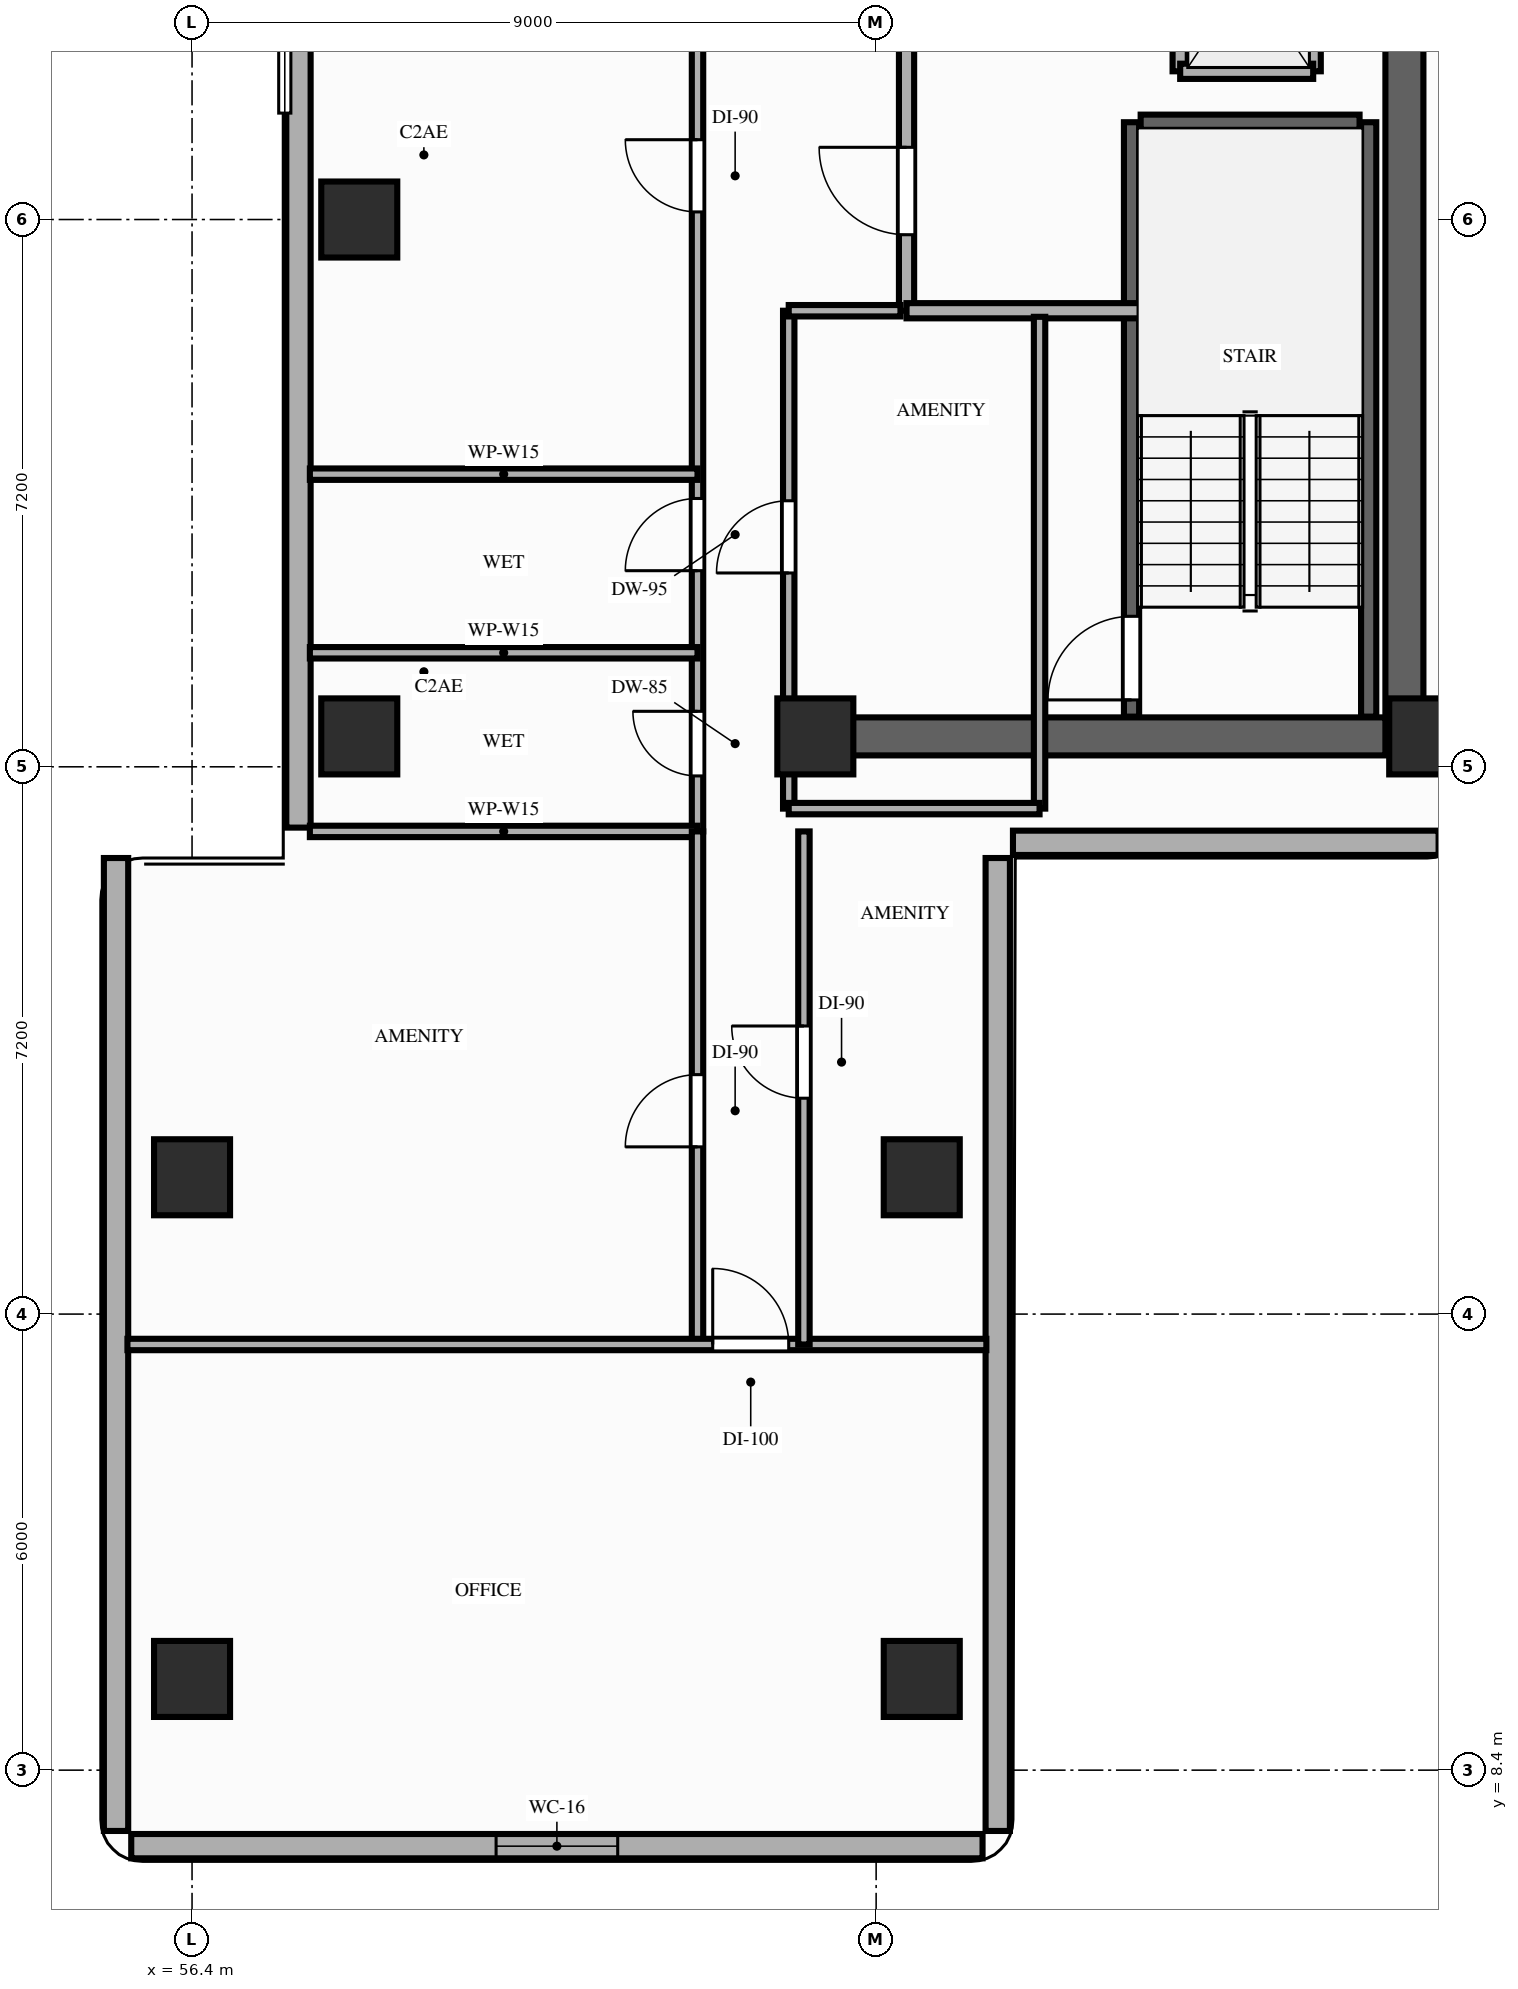
"""IFC4 building model, lengths in metres.
Left out: names, types, materials, properties, quantities, classifications, styles, units other than length and angle.
Written with IfcOpenShell. Run it as: python <this file> out.ifc"""

import sys

from ifc_helpers import new_model, si_unit, direction, frame, frame_2d, origin, origin_2d, place, context, subcontext, project, spatial, rectangle, extrude, element, fill, save


model = new_model("IFC4")
c1 = context("Model", 3, precision=1e-05, world=origin(), true_north=direction((0.0, 1.0)))
c2 = subcontext(c1, "Body", "Model", "MODEL_VIEW")
j1 = project(units=[si_unit("LENGTHUNIT", "METRE"), si_unit("PLANEANGLEUNIT", "RADIAN")], contexts=[c1])
p1 = place(None, origin())
s1 = spatial("IfcSite", under=j1, at=p1, CompositionType="ELEMENT")
p2 = place(p1, origin())
s2 = spatial("IfcBuilding", under=s1, at=p2, CompositionType="ELEMENT")
p3 = place(p2, frame((0.0, 0.0, 43.6)))
s3 = spatial("IfcBuildingStorey", under=s2, at=p3, CompositionType="ELEMENT", Elevation=43.6)
for number, where, z_axis, x_axis in (
    (1, (64.6, 22.0, 0.0), (0.0, 0.0, 1.0), (1.0, 0.0, 0.0)),
    (2, (72.65, 22.0, 0.0), (0.0, 0.0, 1.0), (1.0, 0.0, 0.0)),
    (3, (58.6, 22.0, 0.0), (0.0, 0.0, 1.0), (1.0, 0.0, 0.0)),
    (4, (58.6, 28.8, 0.0), (0.0, 0.0, 1.0), (1.0, 0.0, 0.0)),
    (5, (56.4, 9.6, 0.0), (0.0, 0.0, 1.0), (1.0, 0.0, 0.0)),
    (6, (56.4, 16.2, 0.0), (0.0, 0.0, 1.0), (1.0, 0.0, 0.0)),
    (7, (66.0, 9.6, 0.0), (0.0, 0.0, 1.0), (1.0, 0.0, 0.0)),
    (8, (66.0, 16.2, 0.0), (0.0, 0.0, 1.0), (1.0, 0.0, 0.0)),
):
    element("IfcColumn", number, at=place(p3, frame(where, z_axis=z_axis, x_axis=x_axis)), inside=s3, PredefinedType="COLUMN", context=c2, shape_type="SweptSolid", body=[
        extrude(rectangle(XDim=1.0, YDim=1.0, at=origin_2d()), origin(), (0.0, 0.0, 1.0), 3.2),
    ])
p4 = place(p3, frame((57.8, 43.4, 0.0), z_axis=(0.0, 0.0, 1.0), x_axis=(0.0, -1.0, 0.0)))
e9 = element("IfcWall", 9, at=p4, inside=s3, PredefinedType="STANDARD", context=c2, shape_type="SweptSolid", body=[
    extrude(rectangle(XDim=22.6, YDim=0.32, at=frame_2d((11.3, 0.0))), origin(), (0.0, 0.0, 1.0), 2.5),
])
p5 = place(p4, frame((3.7, 0.0, 0.0)))
e10 = element("IfcOpeningElement", 10, at=p5, cuts=e9, PredefinedType="OPENING", context=c2, shape_type="SweptSolid", body=[
    extrude(rectangle(XDim=1.4, YDim=2.1, at=frame_2d((0.7, 1.05))), frame((0.0, 0.17, 0.0), z_axis=(0.0, -1.0, 0.0), x_axis=(1.0, 0.0, 0.0)), (0.0, 0.0, 1.0), 0.34),
])
p6 = place(p3, frame((55.6, 7.4, 0.0), z_axis=(0.0, 0.0, 1.0), x_axis=(1.0, 0.0, 0.0)))
e11 = element("IfcWall", 11, at=p6, inside=s3, PredefinedType="STANDARD", context=c2, shape_type="SweptSolid", body=[
    extrude(rectangle(XDim=11.2, YDim=0.32, at=frame_2d((5.6, 0.0))), origin(), (0.0, 0.0, 1.0), 3.02),
])
p7 = place(p6, frame((4.8, 0.0, 0.85)))
e12 = element("IfcOpeningElement", 12, at=p7, cuts=e11, PredefinedType="OPENING", context=c2, shape_type="SweptSolid", body=[
    extrude(rectangle(XDim=1.6, YDim=1.7, at=frame_2d((0.8, 0.85))), frame((0.0, 0.17, 0.0), z_axis=(0.0, -1.0, 0.0), x_axis=(1.0, 0.0, 0.0)), (0.0, 0.0, 1.0), 0.34),
])
for number, where, z_axis, x_axis in (
    (13, (55.4, 20.4, 0.0), (0.0, 0.0, 1.0), (0.0, -1.0, 0.0)),
    (14, (67.0, 7.6, 0.0), (0.0, 0.0, 1.0), (0.0, 1.0, 0.0)),
):
    element("IfcWall", number, at=place(p3, frame(where, z_axis=z_axis, x_axis=x_axis)), inside=s3, PredefinedType="STANDARD", context=c2, shape_type="SweptSolid", body=[
        extrude(rectangle(XDim=12.8, YDim=0.32, at=frame_2d((6.4, 0.0))), origin(), (0.0, 0.0, 1.0), 3.02),
    ])
p8 = place(p3, frame((67.2, 20.6, 0.0), z_axis=(0.0, 0.0, 1.0), x_axis=(1.0, 0.0, 0.0)))
e15 = element("IfcWall", 15, at=p8, inside=s3, PredefinedType="STANDARD", context=c2, shape_type="SweptSolid", body=[
    extrude(rectangle(XDim=5.6, YDim=0.32, at=frame_2d((2.8, 0.0))), origin(), (0.0, 0.0, 1.0), 3.02),
])
p9 = place(p3, frame((72.35, 22.0, 0.0), z_axis=(0.0, 0.0, 1.0), x_axis=(0.0, 1.0, 0.0)))
e16 = element("IfcWall", 16, at=p9, inside=s3, PredefinedType="SHEAR", context=c2, shape_type="SweptSolid", body=[
    extrude(rectangle(XDim=20.25, YDim=0.5, at=frame_2d((10.125, 0.0))), origin(), (0.0, 0.0, 1.0), 3.02),
])
p10 = place(p3, frame((64.6, 22.0, 0.0), z_axis=(0.0, 0.0, 1.0), x_axis=(1.0, 0.0, 0.0)))
e17 = element("IfcWall", 17, at=p10, inside=s3, PredefinedType="SHEAR", context=c2, shape_type="SweptSolid", body=[
    extrude(rectangle(XDim=7.5, YDim=0.5, at=frame_2d((3.75, 0.0))), origin(), (0.0, 0.0, 1.0), 3.02),
])
p11 = place(p3, frame((68.76, 22.26, 0.0), z_axis=(0.0, 0.0, 1.0), x_axis=(0.0, 1.0, 0.0)))
e18 = element("IfcWall", 18, at=p11, inside=s3, PredefinedType="SHEAR", context=c2, shape_type="SweptSolid", body=[
    extrude(rectangle(XDim=7.82, YDim=0.2, at=frame_2d((3.91, 0.0))), origin(), (0.0, 0.0, 1.0), 3.02),
])
p12 = place(p11, frame((0.22, 0.0, 0.0)))
e19 = element("IfcOpeningElement", 19, at=p12, cuts=e18, PredefinedType="OPENING", context=c2, shape_type="SweptSolid", body=[
    extrude(rectangle(XDim=1.1, YDim=2.15, at=frame_2d((0.55, 1.075))), frame((0.0, 0.11, 0.0), z_axis=(0.0, -1.0, 0.0), x_axis=(1.0, 0.0, 0.0)), (0.0, 0.0, 1.0), 0.22),
])
p13 = place(p3, frame((71.88, 22.26, 0.0), z_axis=(0.0, 0.0, 1.0), x_axis=(0.0, 1.0, 0.0)))
e20 = element("IfcWall", 20, at=p13, inside=s3, PredefinedType="SHEAR", context=c2, shape_type="SweptSolid", body=[
    extrude(rectangle(XDim=7.82, YDim=0.2, at=frame_2d((3.91, 0.0))), origin(), (0.0, 0.0, 1.0), 3.02),
])
p14 = place(p3, frame((68.88, 30.08, 0.0), z_axis=(0.0, 0.0, 1.0), x_axis=(1.0, 0.0, 0.0)))
e21 = element("IfcWall", 21, at=p14, inside=s3, PredefinedType="SHEAR", context=c2, shape_type="SweptSolid", body=[
    extrude(rectangle(XDim=2.88, YDim=0.2, at=frame_2d((1.44, 0.0))), origin(), (0.0, 0.0, 1.0), 3.02),
])
p15 = place(p3, frame((69.4, 30.75, 0.0), z_axis=(0.0, 0.0, 1.0), x_axis=(0.0, 1.0, 0.0)))
e22 = element("IfcWall", 22, at=p15, inside=s3, PredefinedType="MOVABLE", context=c2, shape_type="SweptSolid", body=[
    extrude(rectangle(XDim=2.45, YDim=0.2, at=frame_2d((1.225, 0.0))), origin(), (0.0, 0.0, 1.0), 3.02),
])
p16 = place(p15, frame((0.65, 0.0, 0.0)))
e23 = element("IfcOpeningElement", 23, at=p16, cuts=e22, PredefinedType="OPENING", context=c2, shape_type="SweptSolid", body=[
    extrude(rectangle(XDim=1.05, YDim=2.15, at=frame_2d((0.525, 1.075))), frame((0.0, 0.11, 0.0), z_axis=(0.0, -1.0, 0.0), x_axis=(1.0, 0.0, 0.0)), (0.0, 0.0, 1.0), 0.22),
])
p17 = place(p3, frame((71.15, 30.75, 0.0), z_axis=(0.0, 0.0, 1.0), x_axis=(0.0, 1.0, 0.0)))
e24 = element("IfcWall", 24, at=p17, inside=s3, PredefinedType="MOVABLE", context=c2, shape_type="SweptSolid", body=[
    extrude(rectangle(XDim=2.45, YDim=0.2, at=frame_2d((1.225, 0.0))), origin(), (0.0, 0.0, 1.0), 3.02),
])
p18 = place(p3, frame((69.4, 30.75, 0.0), z_axis=(0.0, 0.0, 1.0), x_axis=(1.0, 0.0, 0.0)))
e25 = element("IfcWall", 25, at=p18, inside=s3, PredefinedType="MOVABLE", context=c2, shape_type="SweptSolid", body=[
    extrude(rectangle(XDim=1.75, YDim=0.2, at=frame_2d((0.875, 0.0))), origin(), (0.0, 0.0, 1.0), 3.02),
])
p19 = place(p3, frame((65.8, 27.6, 0.0), z_axis=(0.0, 0.0, 1.0), x_axis=(0.0, 1.0, 0.0)))
e26 = element("IfcWall", 26, at=p19, inside=s3, PredefinedType="PARTITIONING", context=c2, shape_type="SweptSolid", body=[
    extrude(rectangle(XDim=5.5, YDim=0.2, at=frame_2d((2.75, 0.0))), origin(), (0.0, 0.0, 1.0), 3.02),
])
p20 = place(p19, frame((1.0, 0.0, 0.0)))
e27 = element("IfcOpeningElement", 27, at=p20, cuts=e26, PredefinedType="OPENING", context=c2, shape_type="SweptSolid", body=[
    extrude(rectangle(XDim=1.15, YDim=2.15, at=frame_2d((0.575, 1.075))), frame((0.0, 0.11, 0.0), z_axis=(0.0, -1.0, 0.0), x_axis=(1.0, 0.0, 0.0)), (0.0, 0.0, 1.0), 0.22),
])
p21 = place(p3, frame((65.8, 27.6, 0.0), z_axis=(0.0, 0.0, 1.0), x_axis=(1.0, 0.0, 0.0)))
e28 = element("IfcWall", 28, at=p21, inside=s3, PredefinedType="PARTITIONING", context=c2, shape_type="SweptSolid", body=[
    extrude(rectangle(XDim=3.4, YDim=0.2, at=frame_2d((1.7, 0.0))), origin(), (0.0, 0.0, 1.0), 3.02),
])
p22 = place(p3, frame((64.25, 21.05, 0.0), z_axis=(0.0, 0.0, 1.0), x_axis=(0.0, 1.0, 0.0)))
e29 = element("IfcWall", 29, at=p22, inside=s3, PredefinedType="PARTITIONING", context=c2, shape_type="SweptSolid", body=[
    extrude(rectangle(XDim=6.55, YDim=0.15, at=frame_2d((3.275, 0.0))), origin(), (0.0, 0.0, 1.0), 2.5),
])
p23 = place(p22, frame((3.1, 0.0, 0.0)))
e30 = element("IfcOpeningElement", 30, at=p23, cuts=e29, PredefinedType="OPENING", context=c2, shape_type="SweptSolid", body=[
    extrude(rectangle(XDim=0.95, YDim=2.15, at=frame_2d((0.475, 1.075))), frame((0.0, 0.085, 0.0), z_axis=(0.0, -1.0, 0.0), x_axis=(1.0, 0.0, 0.0)), (0.0, 0.0, 1.0), 0.17),
])
p24 = place(p3, frame((67.55, 21.05, 0.0), z_axis=(0.0, 0.0, 1.0), x_axis=(0.0, 1.0, 0.0)))
e31 = element("IfcWall", 31, at=p24, inside=s3, PredefinedType="PARTITIONING", context=c2, shape_type="SweptSolid", body=[
    extrude(rectangle(XDim=6.47, YDim=0.15, at=frame_2d((3.235, 0.0))), origin(), (0.0, 0.0, 1.0), 2.5),
])
p25 = place(p3, frame((64.25, 21.05, 0.0), z_axis=(0.0, 0.0, 1.0), x_axis=(1.0, 0.0, 0.0)))
e32 = element("IfcWall", 32, at=p25, inside=s3, PredefinedType="PARTITIONING", context=c2, shape_type="SweptSolid", body=[
    extrude(rectangle(XDim=3.3, YDim=0.15, at=frame_2d((1.65, 0.0))), origin(), (0.0, 0.0, 1.0), 2.5),
])
p26 = place(p3, frame((64.25, 27.6, 0.0), z_axis=(0.0, 0.0, 1.0), x_axis=(1.0, 0.0, 0.0)))
e33 = element("IfcWall", 33, at=p26, inside=s3, PredefinedType="PARTITIONING", context=c2, shape_type="SweptSolid", body=[
    extrude(rectangle(XDim=1.47, YDim=0.15, at=frame_2d((0.735, 0.0))), origin(), (0.0, 0.0, 1.0), 2.5),
])
p27 = place(p3, frame((63.05, 20.75, 0.0), z_axis=(0.0, 0.0, 1.0), x_axis=(0.0, 1.0, 0.0)))
e34 = element("IfcWall", 34, at=p27, inside=s3, PredefinedType="PARTITIONING", context=c2, shape_type="SweptSolid", body=[
    extrude(rectangle(XDim=22.7, YDim=0.15, at=frame_2d((11.35, 0.0))), origin(), (0.0, 0.0, 1.0), 2.5),
])
p28 = place(p27, frame((0.73, 0.0, 0.0)))
e35 = element("IfcOpeningElement", 35, at=p28, cuts=e34, PredefinedType="OPENING", context=c2, shape_type="SweptSolid", body=[
    extrude(rectangle(XDim=0.85, YDim=2.1, at=frame_2d((0.425, 1.05))), frame((0.0, 0.085, 0.0), z_axis=(0.0, -1.0, 0.0), x_axis=(1.0, 0.0, 0.0)), (0.0, 0.0, 1.0), 0.17),
])
p29 = place(p27, frame((3.43, 0.0, 0.0)))
e36 = element("IfcOpeningElement", 36, at=p29, cuts=e34, PredefinedType="OPENING", context=c2, shape_type="SweptSolid", body=[
    extrude(rectangle(XDim=0.95, YDim=2.1, at=frame_2d((0.475, 1.05))), frame((0.0, 0.085, 0.0), z_axis=(0.0, -1.0, 0.0), x_axis=(1.0, 0.0, 0.0)), (0.0, 0.0, 1.0), 0.17),
])
p30 = place(p27, frame((8.15, 0.0, 0.0)))
e37 = element("IfcOpeningElement", 37, at=p30, cuts=e34, PredefinedType="OPENING", context=c2, shape_type="SweptSolid", body=[
    extrude(rectangle(XDim=0.95, YDim=2.15, at=frame_2d((0.475, 1.075))), frame((0.0, 0.085, 0.0), z_axis=(0.0, -1.0, 0.0), x_axis=(1.0, 0.0, 0.0)), (0.0, 0.0, 1.0), 0.17),
])
for number, where, z_axis, x_axis in (
    (38, (57.95, 20.75, 0.0), (0.0, 0.0, 1.0), (1.0, 0.0, 0.0)),
    (39, (57.95, 23.1, 0.0), (0.0, 0.0, 1.0), (1.0, 0.0, 0.0)),
    (40, (57.95, 25.45, 0.0), (0.0, 0.0, 1.0), (1.0, 0.0, 0.0)),
):
    element("IfcWall", number, at=place(p3, frame(where, z_axis=z_axis, x_axis=x_axis)), inside=s3, PredefinedType="PARTITIONING", context=c2, shape_type="SweptSolid", body=[
        extrude(rectangle(XDim=5.1, YDim=0.15, at=frame_2d((2.55, 0.0))), origin(), (0.0, 0.0, 1.0), 2.5),
    ])
p31 = place(p3, frame((63.05, 14.0, 0.0), z_axis=(0.0, 0.0, 1.0), x_axis=(0.0, 1.0, 0.0)))
e41 = element("IfcWall", 41, at=p31, inside=s3, PredefinedType="PARTITIONING", context=c2, shape_type="SweptSolid", body=[
    extrude(rectangle(XDim=6.75, YDim=0.15, at=frame_2d((3.375, 0.0))), origin(), (0.0, 0.0, 1.0), 2.5),
])
p32 = place(p31, frame((2.6, 0.0, 0.0)))
e42 = element("IfcOpeningElement", 42, at=p32, cuts=e41, PredefinedType="OPENING", context=c2, shape_type="SweptSolid", body=[
    extrude(rectangle(XDim=0.95, YDim=2.15, at=frame_2d((0.475, 1.075))), frame((0.0, 0.085, 0.0), z_axis=(0.0, -1.0, 0.0), x_axis=(1.0, 0.0, 0.0)), (0.0, 0.0, 1.0), 0.17),
])
p33 = place(p3, frame((55.55, 14.0, 0.0), z_axis=(0.0, 0.0, 1.0), x_axis=(1.0, 0.0, 0.0)))
e43 = element("IfcWall", 43, at=p33, inside=s3, PredefinedType="PARTITIONING", context=c2, shape_type="SweptSolid", body=[
    extrude(rectangle(XDim=11.3, YDim=0.15, at=frame_2d((5.65, 0.0))), origin(), (0.0, 0.0, 1.0), 2.5),
])
p34 = place(p33, frame((7.7, 0.0, 0.0)))
e44 = element("IfcOpeningElement", 44, at=p34, cuts=e43, PredefinedType="OPENING", context=c2, shape_type="SweptSolid", body=[
    extrude(rectangle(XDim=1.0, YDim=2.15, at=frame_2d((0.5, 1.075))), frame((0.0, 0.085, 0.0), z_axis=(0.0, -1.0, 0.0), x_axis=(1.0, 0.0, 0.0)), (0.0, 0.0, 1.0), 0.17),
])
p35 = place(p3, frame((64.45, 14.0, 0.0), z_axis=(0.0, 0.0, 1.0), x_axis=(0.0, 1.0, 0.0)))
e45 = element("IfcWall", 45, at=p35, inside=s3, PredefinedType="PARTITIONING", context=c2, shape_type="SweptSolid", body=[
    extrude(rectangle(XDim=6.75, YDim=0.15, at=frame_2d((3.375, 0.0))), origin(), (0.0, 0.0, 1.0), 2.5),
])
p36 = place(p35, frame((3.24, 0.0, 0.0)))
e46 = element("IfcOpeningElement", 46, at=p36, cuts=e45, PredefinedType="OPENING", context=c2, shape_type="SweptSolid", body=[
    extrude(rectangle(XDim=0.95, YDim=2.15, at=frame_2d((0.475, 1.075))), frame((0.0, 0.085, 0.0), z_axis=(0.0, -1.0, 0.0), x_axis=(1.0, 0.0, 0.0)), (0.0, 0.0, 1.0), 0.17),
])
p37 = place(p7, origin())
e47 = element("IfcWindow", 47, at=p37, inside=s3, PartitioningType="SINGLE_PANEL", PredefinedType="WINDOW", context=c2, shape_type="SweptSolid", body=[
    extrude(rectangle(XDim=1.6, YDim=1.7, at=frame_2d((0.8, 0.85))), frame((0.0, 0.03, 0.0), z_axis=(0.0, -1.0, 0.0), x_axis=(1.0, 0.0, 0.0)), (0.0, 0.0, 1.0), 0.06),
])
fill(e12, e47)
p38 = place(p12, origin())
e48 = element("IfcDoor", 48, at=p38, inside=s3, OperationType="SINGLE_SWING_LEFT", PredefinedType="DOOR", context=c2, shape_type="SweptSolid", body=[
    extrude(rectangle(XDim=1.1, YDim=2.15, at=frame_2d((0.55, 1.075))), frame((0.0, 0.025, 0.0), z_axis=(0.0, -1.0, 0.0), x_axis=(1.0, 0.0, 0.0)), (0.0, 0.0, 1.0), 0.05),
])
fill(e19, e48)
p39 = place(p20, origin())
e49 = element("IfcDoor", 49, at=p39, inside=s3, OperationType="SINGLE_SWING_RIGHT", PredefinedType="DOOR", context=c2, shape_type="SweptSolid", body=[
    extrude(rectangle(XDim=1.15, YDim=2.15, at=frame_2d((0.575, 1.075))), frame((0.0, 0.025, 0.0), z_axis=(0.0, -1.0, 0.0), x_axis=(1.0, 0.0, 0.0)), (0.0, 0.0, 1.0), 0.05),
])
fill(e27, e49)
p40 = place(p23, origin())
e50 = element("IfcDoor", 50, at=p40, inside=s3, OperationType="SINGLE_SWING_LEFT", PredefinedType="DOOR", context=c2, shape_type="SweptSolid", body=[
    extrude(rectangle(XDim=0.95, YDim=2.15, at=frame_2d((0.475, 1.075))), frame((0.0, 0.025, 0.0), z_axis=(0.0, -1.0, 0.0), x_axis=(1.0, 0.0, 0.0)), (0.0, 0.0, 1.0), 0.05),
])
fill(e30, e50)
p41 = place(p28, origin())
e51 = element("IfcDoor", 51, at=p41, inside=s3, OperationType="SINGLE_SWING_RIGHT", PredefinedType="DOOR", context=c2, shape_type="SweptSolid", body=[
    extrude(rectangle(XDim=0.85, YDim=2.1, at=frame_2d((0.425, 1.05))), frame((0.0, 0.025, 0.0), z_axis=(0.0, -1.0, 0.0), x_axis=(1.0, 0.0, 0.0)), (0.0, 0.0, 1.0), 0.05),
])
fill(e35, e51)
p42 = place(p29, origin())
e52 = element("IfcDoor", 52, at=p42, inside=s3, OperationType="SINGLE_SWING_LEFT", PredefinedType="DOOR", context=c2, shape_type="SweptSolid", body=[
    extrude(rectangle(XDim=0.95, YDim=2.1, at=frame_2d((0.475, 1.05))), frame((0.0, 0.025, 0.0), z_axis=(0.0, -1.0, 0.0), x_axis=(1.0, 0.0, 0.0)), (0.0, 0.0, 1.0), 0.05),
])
fill(e36, e52)
p43 = place(p30, origin())
e53 = element("IfcDoor", 53, at=p43, inside=s3, OperationType="SINGLE_SWING_RIGHT", PredefinedType="DOOR", context=c2, shape_type="SweptSolid", body=[
    extrude(rectangle(XDim=0.95, YDim=2.15, at=frame_2d((0.475, 1.075))), frame((0.0, 0.025, 0.0), z_axis=(0.0, -1.0, 0.0), x_axis=(1.0, 0.0, 0.0)), (0.0, 0.0, 1.0), 0.05),
])
fill(e37, e53)
p44 = place(p32, origin())
e54 = element("IfcDoor", 54, at=p44, inside=s3, OperationType="SINGLE_SWING_LEFT", PredefinedType="DOOR", context=c2, shape_type="SweptSolid", body=[
    extrude(rectangle(XDim=0.95, YDim=2.15, at=frame_2d((0.475, 1.075))), frame((0.0, 0.025, 0.0), z_axis=(0.0, -1.0, 0.0), x_axis=(1.0, 0.0, 0.0)), (0.0, 0.0, 1.0), 0.05),
])
fill(e42, e54)
p45 = place(p36, origin())
e55 = element("IfcDoor", 55, at=p45, inside=s3, OperationType="SINGLE_SWING_RIGHT", PredefinedType="DOOR", context=c2, shape_type="SweptSolid", body=[
    extrude(rectangle(XDim=0.95, YDim=2.15, at=frame_2d((0.475, 1.075))), frame((0.0, 0.025, 0.0), z_axis=(0.0, -1.0, 0.0), x_axis=(1.0, 0.0, 0.0)), (0.0, 0.0, 1.0), 0.05),
])
fill(e46, e55)
p46 = place(p34, origin())
e56 = element("IfcDoor", 56, at=p46, inside=s3, OperationType="SINGLE_SWING_LEFT", PredefinedType="DOOR", context=c2, shape_type="SweptSolid", body=[
    extrude(rectangle(XDim=1.0, YDim=2.15, at=frame_2d((0.5, 1.075))), frame((0.0, 0.025, 0.0), z_axis=(0.0, -1.0, 0.0), x_axis=(1.0, 0.0, 0.0)), (0.0, 0.0, 1.0), 0.05),
])
fill(e44, e56)
save(model, sys.argv[1])
